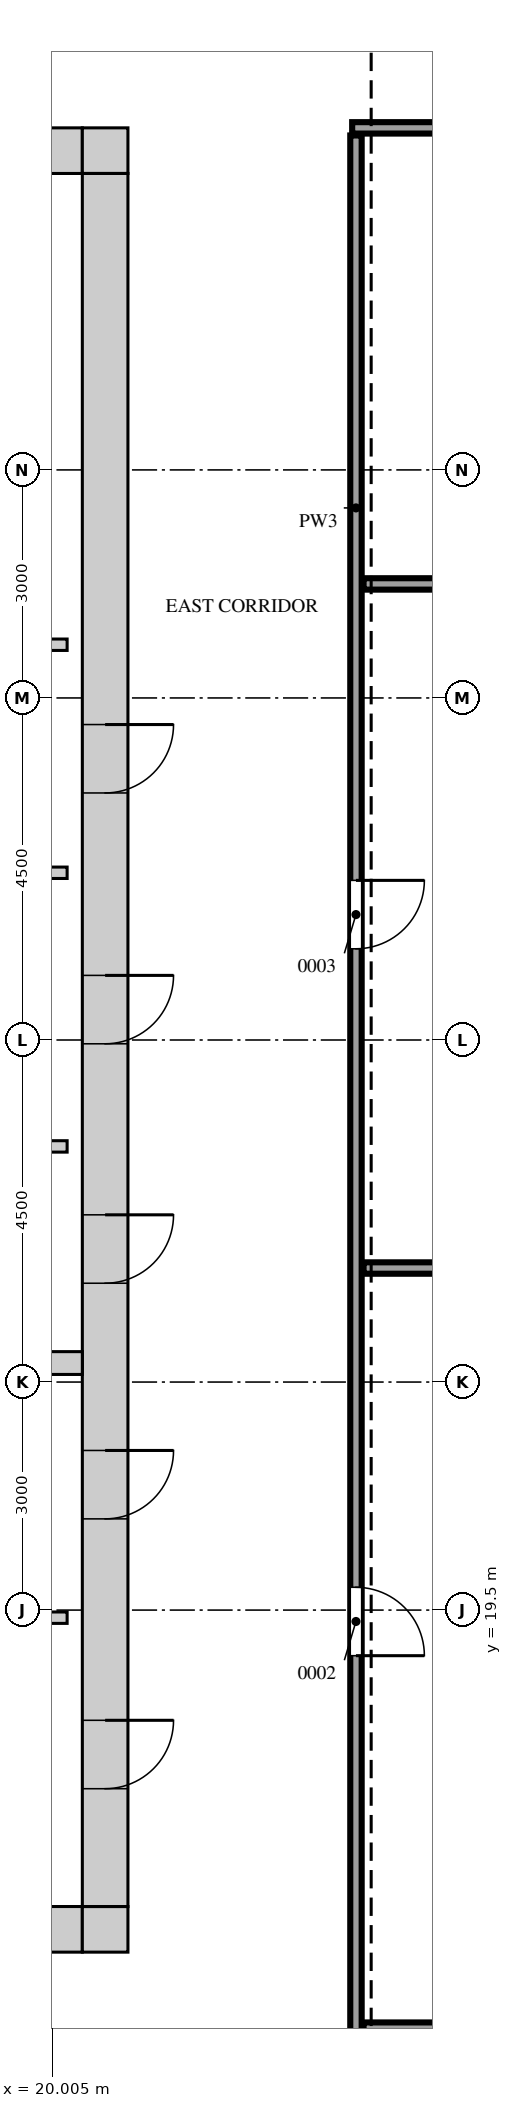
"""IFC4 building model, lengths in metres.
Left out: names, types, materials, properties, quantities, classifications, styles, units other than length and angle.
Written with IfcOpenShell. Run it as: python <this file> out.ifc"""

import sys

from ifc_helpers import new_model, si_unit, direction, frame, frame_2d, origin, place, context, subcontext, project, spatial, rectangle, extrude, source, transform, mapped, element, fill, save


model = new_model("IFC4")
c1 = context("Model", 3, precision=1e-05, world=origin(), true_north=direction((0.0, 1.0)))
c2 = subcontext(c1, "Body", "Model", "MODEL_VIEW")
j1 = project(units=[si_unit("LENGTHUNIT", "METRE"), si_unit("PLANEANGLEUNIT", "RADIAN")], contexts=[c1])
p1 = place(None, origin())
s1 = spatial("IfcSite", under=j1, at=p1, CompositionType="ELEMENT")
p2 = place(p1, origin())
s2 = spatial("IfcBuilding", under=s1, at=p2, CompositionType="ELEMENT")
p3 = place(p2, frame((0.0, 0.0, 339.2)))
s3 = spatial("IfcBuildingStorey", under=s2, at=p3, CompositionType="ELEMENT", Elevation=339.2)
m1 = source(origin(), c2, "Body", "SweptSolid", [
    extrude(rectangle(XDim=14.4, YDim=0.6, at=frame_2d((7.2, 0.0))), origin(), (0.0, 0.0, 1.0), 4.25),
])
p4 = place(p3, frame((6.0, 38.7, 0.0), z_axis=(0.0, 0.0, 1.0), x_axis=(1.0, 0.0, 0.0)))
e1 = element("IfcWall", 1, at=p4, inside=s3, PredefinedType="SHEAR", context=c2, shape_type="MappedRepresentation", body=[
    mapped(m1, transform((0.0, 0.0, 0.0))),
])
m2 = source(origin(), c2, "Body", "SweptSolid", [
    extrude(rectangle(XDim=0.9, YDim=2.1, at=frame_2d((0.45, 1.05))), frame((0.0, 0.31, 0.0), z_axis=(0.0, -1.0, 0.0), x_axis=(1.0, 0.0, 0.0)), (0.0, 0.0, 1.0), 0.62),
])
p5 = place(p4, frame((3.7, 0.0, 0.0)))
e2 = element("IfcOpeningElement", 2, at=p5, cuts=e1, PredefinedType="OPENING", context=c2, shape_type="MappedRepresentation", body=[
    mapped(m2, transform((0.0, 0.0, 0.0))),
])
p6 = place(p4, frame((10.4, 0.0, 0.0)))
e3 = element("IfcOpeningElement", 3, at=p6, cuts=e1, PredefinedType="OPENING", context=c2, shape_type="MappedRepresentation", body=[
    mapped(m2, transform((0.0, 0.0, 0.0))),
])
m3 = source(origin(), c2, "Body", "SweptSolid", [
    extrude(rectangle(XDim=0.6, YDim=0.6, at=frame_2d((0.3, 0.0))), origin(), (0.0, 0.0, 1.0), 4.25),
])
p7 = place(p3, frame((20.4, 38.7, 0.0), z_axis=(0.0, 0.0, 1.0), x_axis=(1.0, 0.0, 0.0)))
e4 = element("IfcWall", 4, at=p7, inside=s3, PredefinedType="SHEAR", context=c2, shape_type="MappedRepresentation", body=[
    mapped(m3, transform((0.0, 0.0, 0.0))),
])
p8 = place(p3, frame((6.0, 15.3, 0.0), z_axis=(0.0, 0.0, 1.0), x_axis=(1.0, 0.0, 0.0)))
e5 = element("IfcWall", 5, at=p8, inside=s3, PredefinedType="SHEAR", context=c2, shape_type="MappedRepresentation", body=[
    mapped(m1, transform((0.0, 0.0, 0.0))),
])
m4 = source(origin(), c2, "Body", "SweptSolid", [
    extrude(rectangle(XDim=1.2, YDim=2.1, at=frame_2d((0.6, 1.05))), frame((0.0, 0.31, 0.0), z_axis=(0.0, -1.0, 0.0), x_axis=(1.0, 0.0, 0.0)), (0.0, 0.0, 1.0), 0.62),
])
p9 = place(p8, frame((6.2, 0.0, 0.0)))
e6 = element("IfcOpeningElement", 6, at=p9, cuts=e5, PredefinedType="OPENING", context=c2, shape_type="MappedRepresentation", body=[
    mapped(m4, transform((0.0, 0.0, 0.0))),
])
p10 = place(p8, frame((2.85, 0.0, 0.0)))
e7 = element("IfcOpeningElement", 7, at=p10, cuts=e5, PredefinedType="OPENING", context=c2, shape_type="MappedRepresentation", body=[
    mapped(m4, transform((0.0, 0.0, 0.0))),
])
m5 = source(origin(), c2, "Body", "SweptSolid", [
    extrude(rectangle(XDim=1.0, YDim=2.1, at=frame_2d((0.5, 1.05))), frame((0.0, 0.31, 0.0), z_axis=(0.0, -1.0, 0.0), x_axis=(1.0, 0.0, 0.0)), (0.0, 0.0, 1.0), 0.62),
])
p11 = place(p8, frame((8.7, 0.0, 0.0)))
e8 = element("IfcOpeningElement", 8, at=p11, cuts=e5, PredefinedType="OPENING", context=c2, shape_type="MappedRepresentation", body=[
    mapped(m5, transform((0.0, 0.0, 0.0))),
])
p12 = place(p3, frame((20.4, 15.3, 0.0), z_axis=(0.0, 0.0, 1.0), x_axis=(1.0, 0.0, 0.0)))
e9 = element("IfcWall", 9, at=p12, inside=s3, PredefinedType="SHEAR", context=c2, shape_type="MappedRepresentation", body=[
    mapped(m3, transform((0.0, 0.0, 0.0))),
])
m6 = source(origin(), c2, "Body", "SweptSolid", [
    extrude(rectangle(XDim=22.8, YDim=0.6, at=frame_2d((11.4, 0.0))), origin(), (0.0, 0.0, 1.0), 4.25),
])
p13 = place(p3, frame((20.7, 15.6, 0.0), z_axis=(0.0, 0.0, 1.0), x_axis=(0.0, 1.0, 0.0)))
e10 = element("IfcWall", 10, at=p13, inside=s3, PredefinedType="SHEAR", context=c2, shape_type="MappedRepresentation", body=[
    mapped(m6, transform((0.0, 0.0, 0.0))),
])
p14 = place(p13, frame((8.2, 0.0, 0.0)))
e11 = element("IfcOpeningElement", 11, at=p14, cuts=e10, PredefinedType="OPENING", context=c2, shape_type="MappedRepresentation", body=[
    mapped(m2, transform((0.0, 0.0, 0.0))),
])
p15 = place(p13, frame((11.35, 0.0, 0.0)))
e12 = element("IfcOpeningElement", 12, at=p15, cuts=e10, PredefinedType="OPENING", context=c2, shape_type="MappedRepresentation", body=[
    mapped(m2, transform((0.0, 0.0, 0.0))),
])
p16 = place(p13, frame((14.65, 0.0, 0.0)))
e13 = element("IfcOpeningElement", 13, at=p16, cuts=e10, PredefinedType="OPENING", context=c2, shape_type="MappedRepresentation", body=[
    mapped(m2, transform((0.0, 0.0, 0.0))),
])
p17 = place(p13, frame((1.55, 0.0, 0.0)))
e14 = element("IfcOpeningElement", 14, at=p17, cuts=e10, PredefinedType="OPENING", context=c2, shape_type="MappedRepresentation", body=[
    mapped(m2, transform((0.0, 0.0, 0.0))),
])
p18 = place(p13, frame((5.1, 0.0, 0.0)))
e15 = element("IfcOpeningElement", 15, at=p18, cuts=e10, PredefinedType="OPENING", context=c2, shape_type="MappedRepresentation", body=[
    mapped(m2, transform((0.0, 0.0, 0.0))),
])
m7 = source(origin(), c2, "Body", "SweptSolid", [
    extrude(rectangle(XDim=13.2, YDim=0.3, at=frame_2d((6.6, 0.0))), origin(), (0.0, 0.0, 1.0), 4.25),
])
p19 = place(p3, frame((7.2, 22.75, 0.0), z_axis=(0.0, 0.0, 1.0), x_axis=(1.0, 0.0, 0.0)))
e16 = element("IfcWall", 16, at=p19, inside=s3, PredefinedType="STANDARD", context=c2, shape_type="MappedRepresentation", body=[
    mapped(m7, transform((0.0, 0.0, 0.0))),
])
m8 = source(origin(), c2, "Body", "SweptSolid", [
    extrude(rectangle(XDim=32.6, YDim=0.15, at=frame_2d((16.3, 0.0))), origin(), (0.0, 0.0, 1.0), 4.3),
])
p20 = place(p3, frame((24.0, 6.3, 0.0), z_axis=(0.0, 0.0, 1.0), x_axis=(0.0, 1.0, 0.0)))
e17 = element("IfcWall", 17, at=p20, inside=s3, PredefinedType="PARTITIONING", context=c2, shape_type="MappedRepresentation", body=[
    mapped(m8, transform((0.0, 0.0, 0.0))),
])
m9 = source(origin(), c2, "Body", "SweptSolid", [
    extrude(rectangle(XDim=0.9, YDim=2.1, at=frame_2d((0.45, 1.05))), frame((0.0, 0.085, 0.0), z_axis=(0.0, -1.0, 0.0), x_axis=(1.0, 0.0, 0.0)), (0.0, 0.0, 1.0), 0.17),
])
p21 = place(p20, frame((3.1, 0.0, 0.0)))
e18 = element("IfcOpeningElement", 18, at=p21, cuts=e17, PredefinedType="OPENING", context=c2, shape_type="MappedRepresentation", body=[
    mapped(m9, transform((0.0, 0.0, 0.0))),
])
p22 = place(p20, frame((12.6, 0.0, 0.0)))
e19 = element("IfcOpeningElement", 19, at=p22, cuts=e17, PredefinedType="OPENING", context=c2, shape_type="MappedRepresentation", body=[
    mapped(m9, transform((0.0, 0.0, 0.0))),
])
p23 = place(p20, frame((21.9, 0.0, 0.0)))
e20 = element("IfcOpeningElement", 20, at=p23, cuts=e17, PredefinedType="OPENING", context=c2, shape_type="MappedRepresentation", body=[
    mapped(m9, transform((0.0, 0.0, 0.0))),
])
m10 = source(origin(), c2, "Body", "SweptSolid", [
    extrude(rectangle(XDim=8.9, YDim=0.15, at=frame_2d((4.45, 0.0))), origin(), (0.0, 0.0, 1.0), 4.3),
])
p24 = place(p3, frame((24.1, 14.0, 0.0), z_axis=(0.0, 0.0, 1.0), x_axis=(1.0, 0.0, 0.0)))
e21 = element("IfcWall", 21, at=p24, inside=s3, PredefinedType="PARTITIONING", context=c2, shape_type="MappedRepresentation", body=[
    mapped(m10, transform((0.0, 0.0, 0.0))),
])
m11 = source(origin(), c2, "Body", "SweptSolid", [
    extrude(rectangle(XDim=4.1, YDim=0.15, at=frame_2d((2.05, 0.0))), origin(), (0.0, 0.0, 1.0), 4.3),
])
p25 = place(p3, frame((16.1, 19.4, 0.0), z_axis=(0.0, 0.0, 1.0), x_axis=(1.0, 0.0, 0.0)))
e22 = element("IfcWall", 22, at=p25, inside=s3, PredefinedType="PARTITIONING", context=c2, shape_type="MappedRepresentation", body=[
    mapped(m11, transform((0.0, 0.0, 0.0))),
])
p26 = place(p3, frame((24.1, 24.0, 0.0), z_axis=(0.0, 0.0, 1.0), x_axis=(1.0, 0.0, 0.0)))
e23 = element("IfcWall", 23, at=p26, inside=s3, PredefinedType="PARTITIONING", context=c2, shape_type="MappedRepresentation", body=[
    mapped(m10, transform((0.0, 0.0, 0.0))),
])
m12 = source(origin(), c2, "Body", "SweptSolid", [
    extrude(rectangle(XDim=13.4, YDim=0.15, at=frame_2d((6.7, 0.0))), origin(), (0.0, 0.0, 1.0), 4.3),
])
for number, where, z_axis, x_axis in (
    (24, (6.8, 25.6, 0.0), (0.0, 0.0, 1.0), (1.0, 0.0, 0.0)),
    (25, (6.8, 29.2, 0.0), (0.0, 0.0, 1.0), (1.0, 0.0, 0.0)),
    (26, (6.8, 32.2, 0.0), (0.0, 0.0, 1.0), (1.0, 0.0, 0.0)),
):
    element("IfcWall", number, at=place(p3, frame(where, z_axis=z_axis, x_axis=x_axis)), inside=s3, PredefinedType="PARTITIONING", context=c2, shape_type="MappedRepresentation", body=[
        mapped(m12, transform((0.0, 0.0, 0.0))),
    ])
p27 = place(p3, frame((24.1, 33.0, 0.0), z_axis=(0.0, 0.0, 1.0), x_axis=(1.0, 0.0, 0.0)))
e27 = element("IfcWall", 27, at=p27, inside=s3, PredefinedType="PARTITIONING", context=c2, shape_type="MappedRepresentation", body=[
    mapped(m10, transform((0.0, 0.0, 0.0))),
])
m13 = source(origin(), c2, "Body", "SweptSolid", [
    extrude(rectangle(XDim=9.05, YDim=0.15, at=frame_2d((4.525, 0.0))), origin(), (0.0, 0.0, 1.0), 4.3),
])
p28 = place(p3, frame((23.95, 39.0, 0.0), z_axis=(0.0, 0.0, 1.0), x_axis=(1.0, 0.0, 0.0)))
e28 = element("IfcWall", 28, at=p28, inside=s3, PredefinedType="PARTITIONING", context=c2, shape_type="MappedRepresentation", body=[
    mapped(m13, transform((0.0, 0.0, 0.0))),
])
p29 = place(p28, frame((2.95, 0.0, 0.0)))
e29 = element("IfcOpeningElement", 29, at=p29, cuts=e28, PredefinedType="OPENING", context=c2, shape_type="MappedRepresentation", body=[
    mapped(m9, transform((0.0, 0.0, 0.0))),
])
m14 = source(origin(), c2, "Body", "SweptSolid", [
    extrude(rectangle(XDim=0.9, YDim=2.1, at=frame_2d((0.45, 1.05))), frame((0.0, 0.25, 0.0), z_axis=(0.0, -1.0, 0.0), x_axis=(1.0, 0.0, 0.0)), (0.0, 0.0, 1.0), 0.5),
])
p30 = place(p14, origin())
e30 = element("IfcDoor", 30, at=p30, inside=s3, OperationType="SINGLE_SWING_RIGHT", PredefinedType="DOOR", context=c2, shape_type="MappedRepresentation", body=[
    mapped(m14, transform((0.0, 0.0, 0.0))),
])
fill(e11, e30)
p31 = place(p15, origin())
e31 = element("IfcDoor", 31, at=p31, inside=s3, OperationType="SINGLE_SWING_RIGHT", PredefinedType="DOOR", context=c2, shape_type="MappedRepresentation", body=[
    mapped(m14, transform((0.0, 0.0, 0.0))),
])
fill(e12, e31)
p32 = place(p16, origin())
e32 = element("IfcDoor", 32, at=p32, inside=s3, OperationType="SINGLE_SWING_RIGHT", PredefinedType="DOOR", context=c2, shape_type="MappedRepresentation", body=[
    mapped(m14, transform((0.0, 0.0, 0.0))),
])
fill(e13, e32)
m15 = source(origin(), c2, "Body", "SweptSolid", [
    extrude(rectangle(XDim=0.9, YDim=2.1, at=frame_2d((0.45, 1.05))), frame((0.0, 0.025, 0.0), z_axis=(0.0, -1.0, 0.0), x_axis=(1.0, 0.0, 0.0)), (0.0, 0.0, 1.0), 0.05),
])
p33 = place(p22, origin())
e33 = element("IfcDoor", 33, at=p33, inside=s3, OperationType="SINGLE_SWING_LEFT", PredefinedType="DOOR", context=c2, shape_type="MappedRepresentation", body=[
    mapped(m15, transform((0.0, 0.0, 0.0))),
])
fill(e19, e33)
p34 = place(p23, origin())
e34 = element("IfcDoor", 34, at=p34, inside=s3, OperationType="SINGLE_SWING_RIGHT", PredefinedType="DOOR", context=c2, shape_type="MappedRepresentation", body=[
    mapped(m15, transform((0.0, 0.0, 0.0))),
])
fill(e20, e34)
p35 = place(p17, origin())
e35 = element("IfcDoor", 35, at=p35, inside=s3, OperationType="SINGLE_SWING_RIGHT", PredefinedType="DOOR", context=c2, shape_type="MappedRepresentation", body=[
    mapped(m14, transform((0.0, 0.0, 0.0))),
])
fill(e14, e35)
p36 = place(p18, origin())
e36 = element("IfcDoor", 36, at=p36, inside=s3, OperationType="SINGLE_SWING_RIGHT", PredefinedType="DOOR", context=c2, shape_type="MappedRepresentation", body=[
    mapped(m14, transform((0.0, 0.0, 0.0))),
])
fill(e15, e36)
save(model, sys.argv[1])
